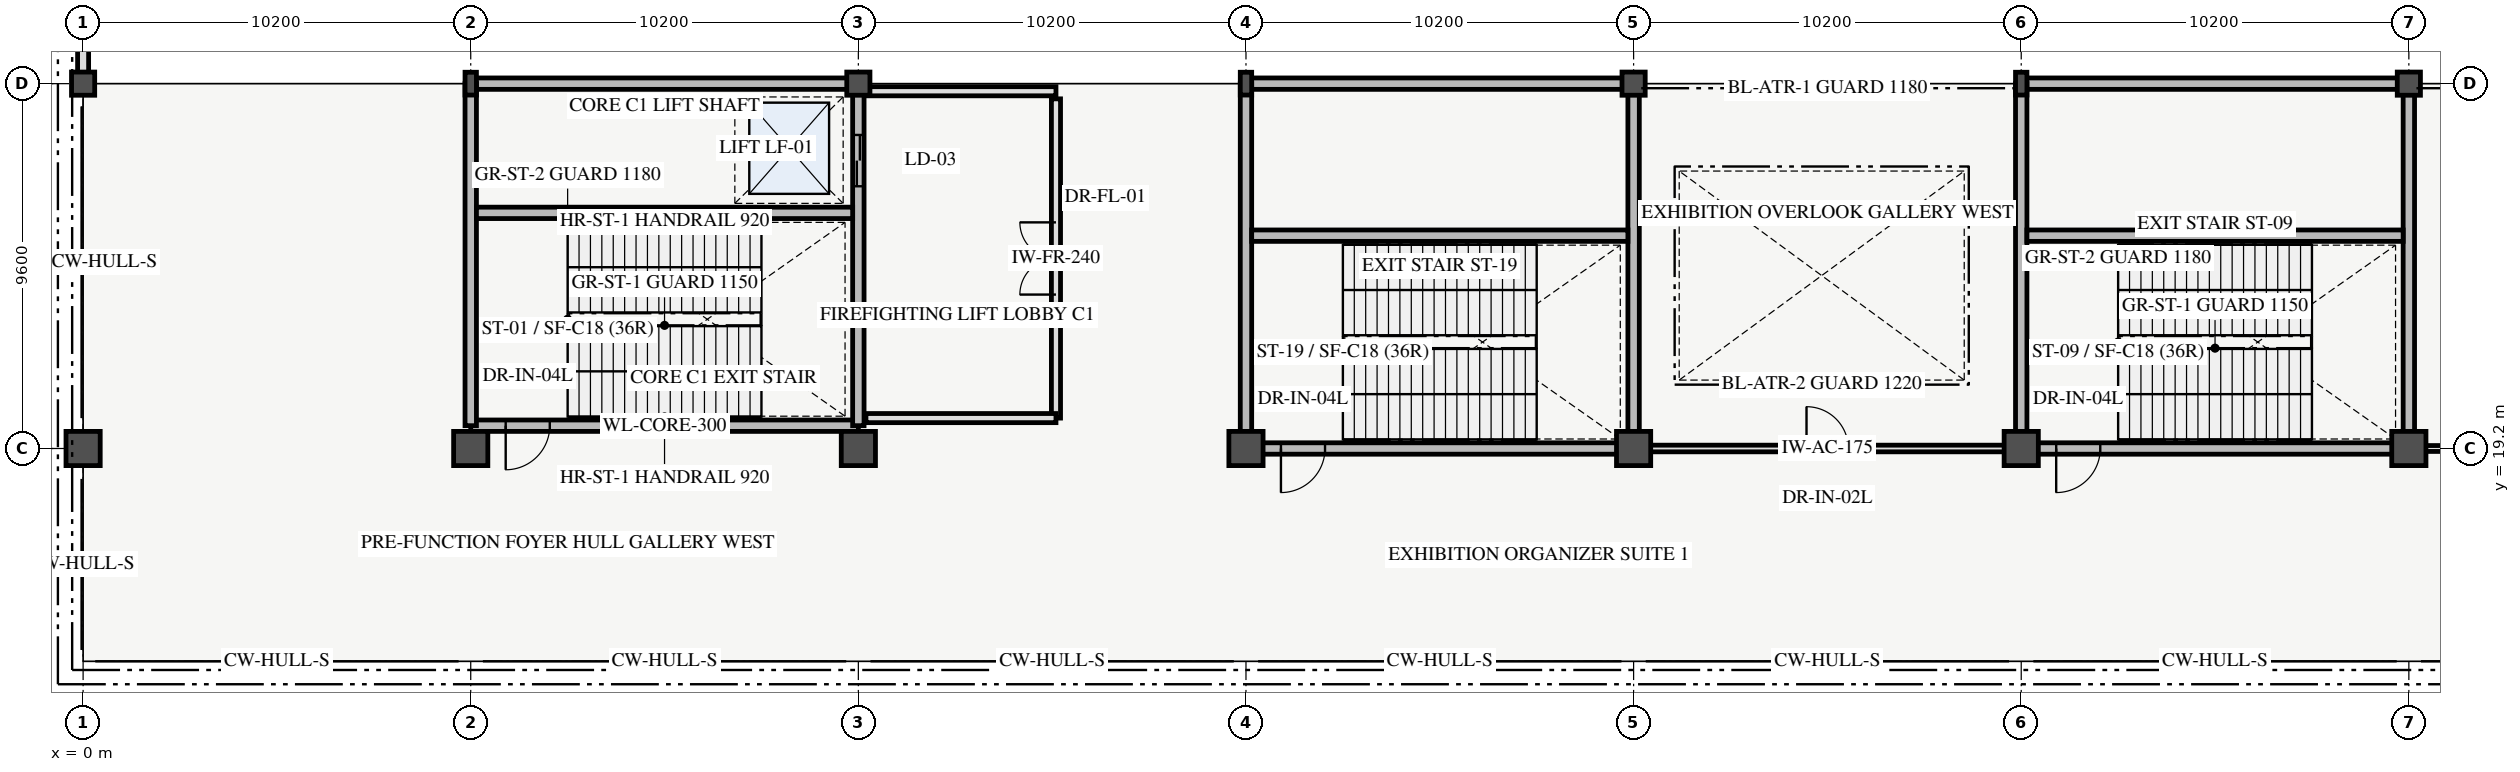
"""IFC4 building model, lengths in metres.
Left out: names, types, materials, properties, quantities, classifications, styles, units other than length and angle.
Written with IfcOpenShell. Run it as: python <this file> out.ifc"""

import sys

from ifc_helpers import new_model, si_unit, direction, frame, frame_2d, origin, origin_2d, place, context, subcontext, project, spatial, rectangle, hollow_circle, i_section, extrude, element, fill, save


model = new_model("IFC4")
c1 = context("Model", 3, precision=1e-05, world=origin(), true_north=direction((0.0, 1.0)))
c2 = subcontext(c1, "Body", "Model", "MODEL_VIEW")
j1 = project(units=[si_unit("LENGTHUNIT", "METRE"), si_unit("PLANEANGLEUNIT", "RADIAN")], contexts=[c1])
p1 = place(None, origin())
s1 = spatial("IfcSite", under=j1, at=p1, CompositionType="ELEMENT")
p2 = place(p1, origin())
s2 = spatial("IfcBuilding", under=s1, at=p2, CompositionType="ELEMENT")
p3 = place(p2, frame((0.0, 0.0, 5.4)))
s3 = spatial("IfcBuildingStorey", under=s2, at=p3, CompositionType="ELEMENT", Elevation=5.4)
p4 = place(p3, frame((0.0, 19.2, 0.0), z_axis=(0.0, 0.0, 1.0), x_axis=(1.0, 0.0, 0.0)))
e1 = element("IfcColumn", 1, at=p4, inside=s3, PredefinedType="COLUMN", context=c2, shape_type="SweptSolid", body=[
    extrude(rectangle(XDim=0.9, YDim=0.9, at=origin_2d()), origin(), (0.0, 0.0, 1.0), 5.4),
])
p5 = place(p3, frame((0.0, 28.8, 0.0), z_axis=(0.0, 0.0, 1.0), x_axis=(1.0, 0.0, 0.0)))
e2 = element("IfcColumn", 2, at=p5, inside=s3, PredefinedType="COLUMN", context=c2, shape_type="SweptSolid", body=[
    extrude(hollow_circle(Radius=0.305, WallThickness=0.025, at=origin_2d()), origin(), (0.0, 0.0, 1.0), 5.4),
])
p6 = place(p3, frame((10.2, 19.2, 0.0), z_axis=(0.0, 0.0, 1.0), x_axis=(1.0, 0.0, 0.0)))
e3 = element("IfcColumn", 3, at=p6, inside=s3, PredefinedType="COLUMN", context=c2, shape_type="SweptSolid", body=[
    extrude(rectangle(XDim=0.9, YDim=0.9, at=origin_2d()), origin(), (0.0, 0.0, 1.0), 5.4),
])
p7 = place(p3, frame((10.2, 28.8, 0.0), z_axis=(0.0, 0.0, 1.0), x_axis=(1.0, 0.0, 0.0)))
e4 = element("IfcColumn", 4, at=p7, inside=s3, PredefinedType="COLUMN", context=c2, shape_type="SweptSolid", body=[
    extrude(i_section(OverallWidth=0.3, OverallDepth=0.6, WebThickness=0.015, FlangeThickness=0.03, FilletRadius=0.027, at=origin_2d()), origin(), (0.0, 0.0, 1.0), 5.4),
])
p8 = place(p3, frame((20.4, 19.2, 0.0), z_axis=(0.0, 0.0, 1.0), x_axis=(1.0, 0.0, 0.0)))
e5 = element("IfcColumn", 5, at=p8, inside=s3, PredefinedType="COLUMN", context=c2, shape_type="SweptSolid", body=[
    extrude(rectangle(XDim=0.9, YDim=0.9, at=origin_2d()), origin(), (0.0, 0.0, 1.0), 5.4),
])
p9 = place(p3, frame((20.4, 28.8, 0.0), z_axis=(0.0, 0.0, 1.0), x_axis=(1.0, 0.0, 0.0)))
e6 = element("IfcColumn", 6, at=p9, inside=s3, PredefinedType="COLUMN", context=c2, shape_type="SweptSolid", body=[
    extrude(hollow_circle(Radius=0.305, WallThickness=0.025, at=origin_2d()), origin(), (0.0, 0.0, 1.0), 5.4),
])
p10 = place(p3, frame((30.6, 19.2, 0.0), z_axis=(0.0, 0.0, 1.0), x_axis=(1.0, 0.0, 0.0)))
e7 = element("IfcColumn", 7, at=p10, inside=s3, PredefinedType="COLUMN", context=c2, shape_type="SweptSolid", body=[
    extrude(rectangle(XDim=0.9, YDim=0.9, at=origin_2d()), origin(), (0.0, 0.0, 1.0), 5.4),
])
p11 = place(p3, frame((30.6, 28.8, 0.0), z_axis=(0.0, 0.0, 1.0), x_axis=(1.0, 0.0, 0.0)))
e8 = element("IfcColumn", 8, at=p11, inside=s3, PredefinedType="COLUMN", context=c2, shape_type="SweptSolid", body=[
    extrude(i_section(OverallWidth=0.3, OverallDepth=0.6, WebThickness=0.015, FlangeThickness=0.03, FilletRadius=0.027, at=origin_2d()), origin(), (0.0, 0.0, 1.0), 5.4),
])
p12 = place(p3, frame((40.8, 19.2, 0.0), z_axis=(0.0, 0.0, 1.0), x_axis=(1.0, 0.0, 0.0)))
e9 = element("IfcColumn", 9, at=p12, inside=s3, PredefinedType="COLUMN", context=c2, shape_type="SweptSolid", body=[
    extrude(rectangle(XDim=0.9, YDim=0.9, at=origin_2d()), origin(), (0.0, 0.0, 1.0), 5.4),
])
p13 = place(p3, frame((40.8, 28.8, 0.0), z_axis=(0.0, 0.0, 1.0), x_axis=(1.0, 0.0, 0.0)))
e10 = element("IfcColumn", 10, at=p13, inside=s3, PredefinedType="COLUMN", context=c2, shape_type="SweptSolid", body=[
    extrude(hollow_circle(Radius=0.305, WallThickness=0.025, at=origin_2d()), origin(), (0.0, 0.0, 1.0), 5.4),
])
p14 = place(p3, frame((51.0, 19.2, 0.0), z_axis=(0.0, 0.0, 1.0), x_axis=(1.0, 0.0, 0.0)))
e11 = element("IfcColumn", 11, at=p14, inside=s3, PredefinedType="COLUMN", context=c2, shape_type="SweptSolid", body=[
    extrude(rectangle(XDim=0.9, YDim=0.9, at=origin_2d()), origin(), (0.0, 0.0, 1.0), 5.4),
])
p15 = place(p3, frame((51.0, 28.8, 0.0), z_axis=(0.0, 0.0, 1.0), x_axis=(1.0, 0.0, 0.0)))
e12 = element("IfcColumn", 12, at=p15, inside=s3, PredefinedType="COLUMN", context=c2, shape_type="SweptSolid", body=[
    extrude(i_section(OverallWidth=0.3, OverallDepth=0.6, WebThickness=0.015, FlangeThickness=0.03, FilletRadius=0.027, at=origin_2d()), origin(), (0.0, 0.0, 1.0), 5.4),
])
p16 = place(p3, frame((61.2, 19.2, 0.0), z_axis=(0.0, 0.0, 1.0), x_axis=(1.0, 0.0, 0.0)))
e13 = element("IfcColumn", 13, at=p16, inside=s3, PredefinedType="COLUMN", context=c2, shape_type="SweptSolid", body=[
    extrude(rectangle(XDim=0.9, YDim=0.9, at=origin_2d()), origin(), (0.0, 0.0, 1.0), 5.4),
])
p17 = place(p3, frame((61.2, 28.8, 0.0), z_axis=(0.0, 0.0, 1.0), x_axis=(1.0, 0.0, 0.0)))
e14 = element("IfcColumn", 14, at=p17, inside=s3, PredefinedType="COLUMN", context=c2, shape_type="SweptSolid", body=[
    extrude(hollow_circle(Radius=0.305, WallThickness=0.025, at=origin_2d()), origin(), (0.0, 0.0, 1.0), 5.4),
])
p18 = place(p3, frame((10.2, 19.8, 0.0), z_axis=(0.0, 0.0, 1.0), x_axis=(1.0, 0.0, 0.0)))
e15 = element("IfcWall", 15, at=p18, inside=s3, PredefinedType="SHEAR", context=c2, shape_type="SweptSolid", body=[
    extrude(rectangle(XDim=10.2, YDim=0.3, at=frame_2d((5.1, 0.0))), origin(), (0.0, 0.0, 1.0), 5.4),
])
p19 = place(p18, frame((0.92, 0.0, 0.0)))
e16 = element("IfcOpeningElement", 16, at=p19, cuts=e15, PredefinedType="OPENING", context=c2, shape_type="SweptSolid", body=[
    extrude(rectangle(XDim=1.16, YDim=2.2, at=frame_2d((0.58, 1.1))), frame((0.0, 0.16, 0.0), z_axis=(0.0, -1.0, 0.0), x_axis=(1.0, 0.0, 0.0)), (0.0, 0.0, 1.0), 0.32),
])
p20 = place(p3, frame((10.2, 28.8, 0.0), z_axis=(0.0, 0.0, 1.0), x_axis=(1.0, 0.0, 0.0)))
e17 = element("IfcWall", 17, at=p20, inside=s3, PredefinedType="SHEAR", context=c2, shape_type="SweptSolid", body=[
    extrude(rectangle(XDim=10.2, YDim=0.3, at=frame_2d((5.1, 0.0))), origin(), (0.0, 0.0, 1.0), 5.4),
])
p21 = place(p3, frame((10.2, 19.8, 0.0), z_axis=(0.0, 0.0, 1.0), x_axis=(0.0, 1.0, 0.0)))
e18 = element("IfcWall", 18, at=p21, inside=s3, PredefinedType="SHEAR", context=c2, shape_type="SweptSolid", body=[
    extrude(rectangle(XDim=9.0, YDim=0.3, at=frame_2d((4.5, 0.0))), origin(), (0.0, 0.0, 1.0), 5.4),
])
p22 = place(p3, frame((20.4, 19.8, 0.0), z_axis=(0.0, 0.0, 1.0), x_axis=(0.0, 1.0, 0.0)))
e19 = element("IfcWall", 19, at=p22, inside=s3, PredefinedType="SHEAR", context=c2, shape_type="SweptSolid", body=[
    extrude(rectangle(XDim=9.0, YDim=0.3, at=frame_2d((4.5, 0.0))), origin(), (0.0, 0.0, 1.0), 5.4),
])
p23 = place(p22, frame((6.3, 0.0, 0.0)))
e20 = element("IfcOpeningElement", 20, at=p23, cuts=e19, PredefinedType="OPENING", context=c2, shape_type="SweptSolid", body=[
    extrude(rectangle(XDim=1.35, YDim=2.3, at=frame_2d((0.675, 1.15))), frame((0.0, 0.16, 0.0), z_axis=(0.0, -1.0, 0.0), x_axis=(1.0, 0.0, 0.0)), (0.0, 0.0, 1.0), 0.32),
])
p24 = place(p3, frame((0.0, 29.04, 0.0), z_axis=(0.0, 0.0, 1.0), x_axis=(0.0, 1.0, 0.0)))
e21 = element("IfcWall", 21, at=p24, inside=s3, PredefinedType="SOLIDWALL", context=c2, shape_type="SweptSolid", body=[
    extrude(rectangle(XDim=11.32, YDim=0.29, at=frame_2d((5.66, 0.0))), origin(), (0.0, 0.0, 1.0), 4.32),
])
p25 = place(p3, frame((10.35, 25.4, 0.0), z_axis=(0.0, 0.0, 1.0), x_axis=(1.0, 0.0, 0.0)))
e22 = element("IfcWall", 22, at=p25, inside=s3, PredefinedType="SHEAR", context=c2, shape_type="SweptSolid", body=[
    extrude(rectangle(XDim=9.9, YDim=0.3, at=frame_2d((4.95, 0.0))), origin(), (0.0, 0.0, 1.0), 5.4),
])
p26 = place(p3, frame((51.0, 19.2, 0.0), z_axis=(0.0, 0.0, 1.0), x_axis=(1.0, 0.0, 0.0)))
e23 = element("IfcWall", 23, at=p26, inside=s3, PredefinedType="SHEAR", context=c2, shape_type="SweptSolid", body=[
    extrude(rectangle(XDim=10.2, YDim=0.3, at=frame_2d((5.1, 0.0))), origin(), (0.0, 0.0, 1.0), 5.4),
])
p27 = place(p26, frame((0.92, 0.0, 0.0)))
e24 = element("IfcOpeningElement", 24, at=p27, cuts=e23, PredefinedType="OPENING", context=c2, shape_type="SweptSolid", body=[
    extrude(rectangle(XDim=1.16, YDim=2.2, at=frame_2d((0.58, 1.1))), frame((0.0, 0.16, 0.0), z_axis=(0.0, -1.0, 0.0), x_axis=(1.0, 0.0, 0.0)), (0.0, 0.0, 1.0), 0.32),
])
p28 = place(p3, frame((51.0, 28.8, 0.0), z_axis=(0.0, 0.0, 1.0), x_axis=(1.0, 0.0, 0.0)))
e25 = element("IfcWall", 25, at=p28, inside=s3, PredefinedType="SHEAR", context=c2, shape_type="SweptSolid", body=[
    extrude(rectangle(XDim=10.2, YDim=0.3, at=frame_2d((5.1, 0.0))), origin(), (0.0, 0.0, 1.0), 5.4),
])
for number, where, z_axis, x_axis in (
    (26, (51.0, 19.2, 0.0), (0.0, 0.0, 1.0), (0.0, 1.0, 0.0)),
    (27, (61.2, 19.2, 0.0), (0.0, 0.0, 1.0), (0.0, 1.0, 0.0)),
):
    element("IfcWall", number, at=place(p3, frame(where, z_axis=z_axis, x_axis=x_axis)), inside=s3, PredefinedType="SHEAR", context=c2, shape_type="SweptSolid", body=[
        extrude(rectangle(XDim=9.6, YDim=0.3, at=frame_2d((4.8, 0.0))), origin(), (0.0, 0.0, 1.0), 5.4),
    ])
p29 = place(p3, frame((51.15, 24.8, 0.0), z_axis=(0.0, 0.0, 1.0), x_axis=(1.0, 0.0, 0.0)))
e28 = element("IfcWall", 28, at=p29, inside=s3, PredefinedType="SHEAR", context=c2, shape_type="SweptSolid", body=[
    extrude(rectangle(XDim=9.9, YDim=0.3, at=frame_2d((4.95, 0.0))), origin(), (0.0, 0.0, 1.0), 5.4),
])
p30 = place(p3, frame((30.6, 19.2, 0.0), z_axis=(0.0, 0.0, 1.0), x_axis=(1.0, 0.0, 0.0)))
e29 = element("IfcWall", 29, at=p30, inside=s3, PredefinedType="SHEAR", context=c2, shape_type="SweptSolid", body=[
    extrude(rectangle(XDim=10.2, YDim=0.3, at=frame_2d((5.1, 0.0))), origin(), (0.0, 0.0, 1.0), 5.4),
])
p31 = place(p30, frame((0.92, 0.0, 0.0)))
e30 = element("IfcOpeningElement", 30, at=p31, cuts=e29, PredefinedType="OPENING", context=c2, shape_type="SweptSolid", body=[
    extrude(rectangle(XDim=1.16, YDim=2.2, at=frame_2d((0.58, 1.1))), frame((0.0, 0.16, 0.0), z_axis=(0.0, -1.0, 0.0), x_axis=(1.0, 0.0, 0.0)), (0.0, 0.0, 1.0), 0.32),
])
p32 = place(p3, frame((30.6, 28.8, 0.0), z_axis=(0.0, 0.0, 1.0), x_axis=(1.0, 0.0, 0.0)))
e31 = element("IfcWall", 31, at=p32, inside=s3, PredefinedType="SHEAR", context=c2, shape_type="SweptSolid", body=[
    extrude(rectangle(XDim=10.2, YDim=0.3, at=frame_2d((5.1, 0.0))), origin(), (0.0, 0.0, 1.0), 5.4),
])
for number, where, z_axis, x_axis in (
    (32, (30.6, 19.2, 0.0), (0.0, 0.0, 1.0), (0.0, 1.0, 0.0)),
    (33, (40.8, 19.2, 0.0), (0.0, 0.0, 1.0), (0.0, 1.0, 0.0)),
):
    element("IfcWall", number, at=place(p3, frame(where, z_axis=z_axis, x_axis=x_axis)), inside=s3, PredefinedType="SHEAR", context=c2, shape_type="SweptSolid", body=[
        extrude(rectangle(XDim=9.6, YDim=0.3, at=frame_2d((4.8, 0.0))), origin(), (0.0, 0.0, 1.0), 5.4),
    ])
p33 = place(p3, frame((30.75, 24.8, 0.0), z_axis=(0.0, 0.0, 1.0), x_axis=(1.0, 0.0, 0.0)))
e34 = element("IfcWall", 34, at=p33, inside=s3, PredefinedType="SHEAR", context=c2, shape_type="SweptSolid", body=[
    extrude(rectangle(XDim=9.9, YDim=0.3, at=frame_2d((4.95, 0.0))), origin(), (0.0, 0.0, 1.0), 5.4),
])
p34 = place(p3, frame((25.6, 20.0, 0.0), z_axis=(0.0, 0.0, 1.0), x_axis=(0.0, 1.0, 0.0)))
e35 = element("IfcWall", 35, at=p34, inside=s3, PredefinedType="PARTITIONING", context=c2, shape_type="SweptSolid", body=[
    extrude(rectangle(XDim=8.4, YDim=0.24, at=frame_2d((4.2, 0.0))), origin(), (0.0, 0.0, 1.0), 4.2),
])
p35 = place(p34, frame((3.25, 0.0, 0.0)))
e36 = element("IfcOpeningElement", 36, at=p35, cuts=e35, PredefinedType="OPENING", context=c2, shape_type="SweptSolid", body=[
    extrude(rectangle(XDim=1.9, YDim=2.25, at=frame_2d((0.95, 1.125))), frame((0.0, 0.13, 0.0), z_axis=(0.0, -1.0, 0.0), x_axis=(1.0, 0.0, 0.0)), (0.0, 0.0, 1.0), 0.26),
])
for number, where, z_axis, x_axis in (
    (37, (20.6, 28.6, 0.0), (0.0, 0.0, 1.0), (1.0, 0.0, 0.0)),
    (38, (20.6, 20.0, 0.0), (0.0, 0.0, 1.0), (1.0, 0.0, 0.0)),
):
    element("IfcWall", number, at=place(p3, frame(where, z_axis=z_axis, x_axis=x_axis)), inside=s3, PredefinedType="PARTITIONING", context=c2, shape_type="SweptSolid", body=[
        extrude(rectangle(XDim=5.0, YDim=0.24, at=frame_2d((2.5, 0.0))), origin(), (0.0, 0.0, 1.0), 4.2),
    ])
p36 = place(p3, frame((41.2, 19.2, 0.0), z_axis=(0.0, 0.0, 1.0), x_axis=(1.0, 0.0, 0.0)))
e39 = element("IfcWall", 39, at=p36, inside=s3, PredefinedType="PARTITIONING", context=c2, shape_type="SweptSolid", body=[
    extrude(rectangle(XDim=9.4, YDim=0.175, at=frame_2d((4.7, 0.0))), origin(), (0.0, 0.0, 1.0), 4.2),
])
p37 = place(p36, frame((4.15, 0.0, 0.0)))
e40 = element("IfcOpeningElement", 40, at=p37, cuts=e39, PredefinedType="OPENING", context=c2, shape_type="SweptSolid", body=[
    extrude(rectangle(XDim=1.1, YDim=2.2, at=frame_2d((0.55, 1.1))), frame((0.0, 0.097, 0.0), z_axis=(0.0, -1.0, 0.0), x_axis=(1.0, 0.0, 0.0)), (0.0, 0.0, 1.0), 0.195),
])
p38 = place(p3, frame((61.6, 19.2, 0.0), z_axis=(0.0, 0.0, 1.0), x_axis=(1.0, 0.0, 0.0)))
e41 = element("IfcWall", 41, at=p38, inside=s3, PredefinedType="PARTITIONING", context=c2, shape_type="SweptSolid", body=[
    extrude(rectangle(XDim=9.4, YDim=0.155, at=frame_2d((4.7, 0.0))), origin(), (0.0, 0.0, 1.0), 4.2),
])
p39 = place(p38, frame((4.12, 0.0, 0.0)))
e42 = element("IfcOpeningElement", 42, at=p39, cuts=e41, PredefinedType="OPENING", context=c2, shape_type="SweptSolid", body=[
    extrude(rectangle(XDim=1.16, YDim=2.2, at=frame_2d((0.58, 1.1))), frame((0.0, 0.087, 0.0), z_axis=(0.0, -1.0, 0.0), x_axis=(1.0, 0.0, 0.0)), (0.0, 0.0, 1.0), 0.175),
])
p40 = place(p19, origin())
e43 = element("IfcDoor", 43, at=p40, inside=s3, OperationType="SINGLE_SWING_LEFT", PredefinedType="DOOR", context=c2, shape_type="SweptSolid", body=[
    extrude(rectangle(XDim=1.16, YDim=2.2, at=frame_2d((0.58, 1.1))), frame((0.0, 0.025, 0.0), z_axis=(0.0, -1.0, 0.0), x_axis=(1.0, 0.0, 0.0)), (0.0, 0.0, 1.0), 0.05),
])
fill(e16, e43)
p41 = place(p23, origin())
e44 = element("IfcDoor", 44, at=p41, inside=s3, OperationType="DOUBLE_DOOR_SLIDING", PredefinedType="DOOR", context=c2, shape_type="SweptSolid", body=[
    extrude(rectangle(XDim=1.35, YDim=2.3, at=frame_2d((0.675, 1.15))), frame((0.0, 0.025, 0.0), z_axis=(0.0, -1.0, 0.0), x_axis=(1.0, 0.0, 0.0)), (0.0, 0.0, 1.0), 0.05),
])
fill(e20, e44)
p42 = place(p27, origin())
e45 = element("IfcDoor", 45, at=p42, inside=s3, OperationType="SINGLE_SWING_LEFT", PredefinedType="DOOR", context=c2, shape_type="SweptSolid", body=[
    extrude(rectangle(XDim=1.16, YDim=2.2, at=frame_2d((0.58, 1.1))), frame((0.0, 0.025, 0.0), z_axis=(0.0, -1.0, 0.0), x_axis=(1.0, 0.0, 0.0)), (0.0, 0.0, 1.0), 0.05),
])
fill(e24, e45)
p43 = place(p31, origin())
e46 = element("IfcDoor", 46, at=p43, inside=s3, OperationType="SINGLE_SWING_LEFT", PredefinedType="DOOR", context=c2, shape_type="SweptSolid", body=[
    extrude(rectangle(XDim=1.16, YDim=2.2, at=frame_2d((0.58, 1.1))), frame((0.0, 0.025, 0.0), z_axis=(0.0, -1.0, 0.0), x_axis=(1.0, 0.0, 0.0)), (0.0, 0.0, 1.0), 0.05),
])
fill(e30, e46)
p44 = place(p35, origin())
e47 = element("IfcDoor", 47, at=p44, inside=s3, OperationType="DOUBLE_DOOR_SINGLE_SWING", PredefinedType="DOOR", context=c2, shape_type="SweptSolid", body=[
    extrude(rectangle(XDim=1.9, YDim=2.25, at=frame_2d((0.95, 1.125))), frame((0.0, 0.025, 0.0), z_axis=(0.0, -1.0, 0.0), x_axis=(1.0, 0.0, 0.0)), (0.0, 0.0, 1.0), 0.05),
])
fill(e36, e47)
p45 = place(p37, origin())
e48 = element("IfcDoor", 48, at=p45, inside=s3, OperationType="SINGLE_SWING_LEFT", PredefinedType="DOOR", context=c2, shape_type="SweptSolid", body=[
    extrude(rectangle(XDim=1.1, YDim=2.2, at=frame_2d((0.55, 1.1))), frame((0.0, 0.025, 0.0), z_axis=(0.0, -1.0, 0.0), x_axis=(1.0, 0.0, 0.0)), (0.0, 0.0, 1.0), 0.05),
])
fill(e40, e48)
save(model, sys.argv[1])
